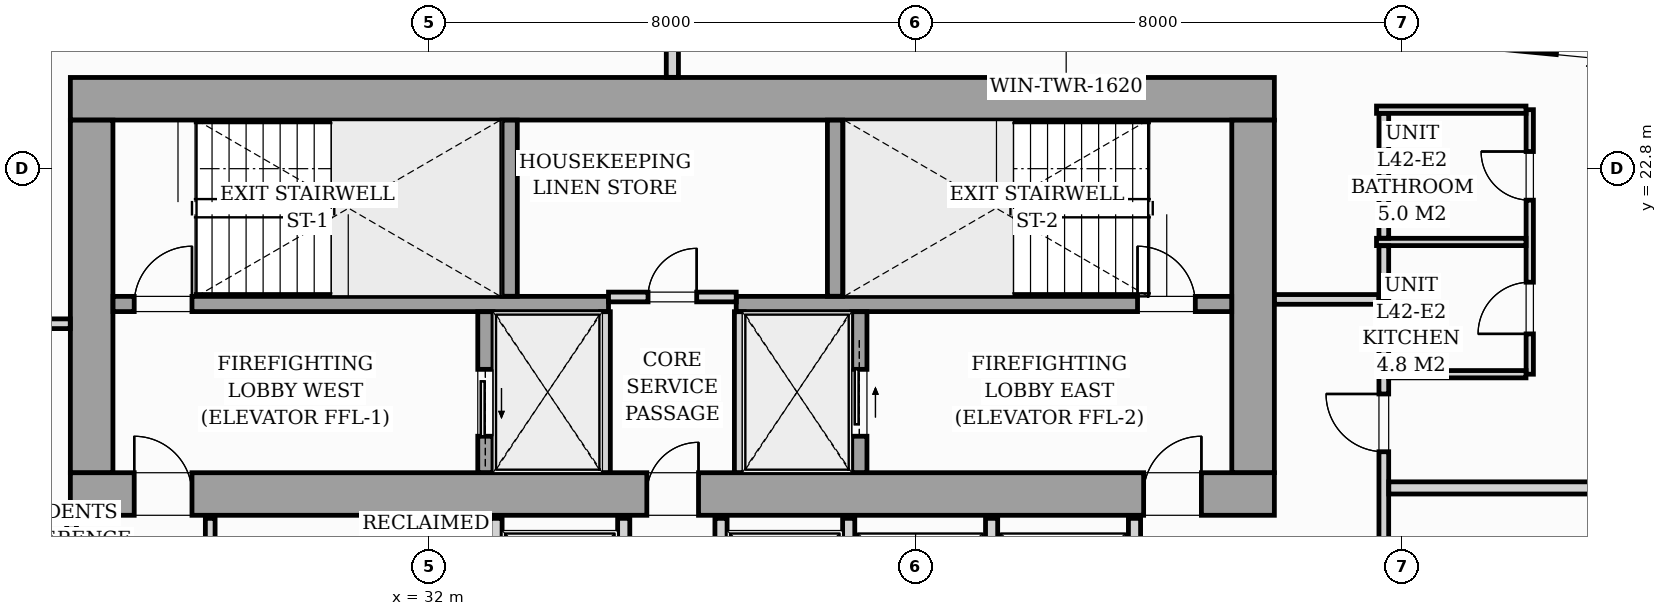
"""IFC4 building model, lengths in metres.
Left out: names, types, materials, properties, quantities, classifications, styles, units other than length and angle.
Written with IfcOpenShell. Run it as: python <this file> out.ifc"""

import sys

from ifc_helpers import new_model, si_unit, direction, frame, frame_2d, origin, origin_2d, place, context, subcontext, project, spatial, rectangle, i_section, extrude, source, transform, mapped, element, fill, save


model = new_model("IFC4")
c1 = context("Model", 3, precision=1e-05, world=origin(), true_north=direction((0.0, 1.0)))
c2 = subcontext(c1, "Body", "Model", "MODEL_VIEW")
j1 = project(units=[si_unit("LENGTHUNIT", "METRE"), si_unit("PLANEANGLEUNIT", "RADIAN")], contexts=[c1])
p1 = place(None, origin())
s1 = spatial("IfcSite", under=j1, at=p1, CompositionType="ELEMENT")
p2 = place(p1, origin())
s2 = spatial("IfcBuilding", under=s1, at=p2, CompositionType="ELEMENT")
p3 = place(p2, frame((0.0, 0.0, 147.0)))
s3 = spatial("IfcBuildingStorey", under=s2, at=p3, CompositionType="ELEMENT", Elevation=147.0)
m1 = source(origin(), c2, "Body", "SweptSolid", [
    extrude(i_section(OverallWidth=0.421, OverallDepth=0.465, WebThickness=0.045, FlangeThickness=0.073, FilletRadius=0.018, at=origin_2d()), origin(), (0.0, 0.0, 1.0), 3.196),
])
for number, where, z_axis, x_axis in (
    (1, (26.4, 17.4, 0.002), (0.0, 0.0, 1.0), (1.0, 0.0, 0.0)),
    (2, (33.12, 17.4, 0.002), (0.0, 0.0, 1.0), (1.0, 0.0, 0.0)),
    (3, (38.88, 17.4, 0.002), (0.0, 0.0, 1.0), (1.0, 0.0, 0.0)),
    (4, (45.6, 17.4, 0.002), (0.0, 0.0, 1.0), (1.0, 0.0, 0.0)),
    (5, (26.4, 24.0, 0.002), (0.0, 0.0, 1.0), (1.0, 0.0, 0.0)),
    (6, (33.12, 24.0, 0.002), (0.0, 0.0, 1.0), (1.0, 0.0, 0.0)),
    (7, (38.88, 24.0, 0.002), (0.0, 0.0, 1.0), (1.0, 0.0, 0.0)),
    (8, (45.6, 24.0, 0.002), (0.0, 0.0, 1.0), (1.0, 0.0, 0.0)),
):
    element("IfcColumn", number, at=place(p3, frame(where, z_axis=z_axis, x_axis=x_axis)), inside=s3, PredefinedType="PILASTER", context=c2, shape_type="MappedRepresentation", body=[
        mapped(m1, transform((0.0, 0.0, 0.0), scale=1.0)),
    ])
p4 = place(p3, frame((40.983, 25.727, 0.0), z_axis=(0.0, 0.0, 1.0), x_axis=(0.995395844771, -0.095849424686, 0.0)))
e9 = element("IfcWall", 9, at=p4, inside=s3, PredefinedType="STANDARD", context=c2, shape_type="SweptSolid", body=[
    extrude(rectangle(XDim=17.01, YDim=0.26, at=frame_2d((8.505, 0.0))), origin(), (0.0, 0.0, 1.0), 2.94),
])
p5 = place(p4, frame((9.61, 0.0, 0.0)))
e10 = element("IfcOpeningElement", 10, at=p5, cuts=e9, PredefinedType="OPENING", context=c2, shape_type="SweptSolid", body=[
    extrude(rectangle(XDim=1.8, YDim=2.06, at=frame_2d((0.9, 1.03))), frame((0.0, 0.14, 0.0), z_axis=(0.0, -1.0, 0.0), x_axis=(1.0, 0.0, 0.0)), (0.0, 0.0, 1.0), 0.28),
])
p6 = place(p4, frame((0.7, 0.0, 0.65)))
e11 = element("IfcOpeningElement", 11, at=p6, cuts=e9, PredefinedType="OPENING", context=c2, shape_type="SweptSolid", body=[
    extrude(rectangle(XDim=1.6, YDim=1.5, at=frame_2d((0.8, 0.75))), frame((0.0, 0.14, 0.0), z_axis=(0.0, -1.0, 0.0), x_axis=(1.0, 0.0, 0.0)), (0.0, 0.0, 1.0), 0.28),
])
p7 = place(p3, frame((26.1, 17.45, 0.0), z_axis=(0.0, 0.0, 1.0), x_axis=(1.0, 0.0, 0.0)))
e12 = element("IfcWall", 12, at=p7, inside=s3, PredefinedType="SHEAR", context=c2, shape_type="SweptSolid", body=[
    extrude(rectangle(XDim=19.8, YDim=0.7, at=frame_2d((9.9, 0.0))), origin(), (0.0, 0.0, 1.0), 3.2),
])
p8 = place(p7, frame((1.05, 0.0, 0.0)))
e13 = element("IfcOpeningElement", 13, at=p8, cuts=e12, PredefinedType="OPENING", context=c2, shape_type="SweptSolid", body=[
    extrude(rectangle(XDim=0.95, YDim=2.06, at=frame_2d((0.475, 1.03))), frame((0.0, 0.36, 0.0), z_axis=(0.0, -1.0, 0.0), x_axis=(1.0, 0.0, 0.0)), (0.0, 0.0, 1.0), 0.72),
])
p9 = place(p7, frame((9.48, 0.0, 0.0)))
e14 = element("IfcOpeningElement", 14, at=p9, cuts=e12, PredefinedType="OPENING", context=c2, shape_type="SweptSolid", body=[
    extrude(rectangle(XDim=0.85, YDim=2.0, at=frame_2d((0.425, 1.0))), frame((0.0, 0.36, 0.0), z_axis=(0.0, -1.0, 0.0), x_axis=(1.0, 0.0, 0.0)), (0.0, 0.0, 1.0), 0.72),
])
p10 = place(p7, frame((17.65, 0.0, 0.0)))
e15 = element("IfcOpeningElement", 15, at=p10, cuts=e12, PredefinedType="OPENING", context=c2, shape_type="SweptSolid", body=[
    extrude(rectangle(XDim=0.95, YDim=2.06, at=frame_2d((0.475, 1.03))), frame((0.0, 0.36, 0.0), z_axis=(0.0, -1.0, 0.0), x_axis=(1.0, 0.0, 0.0)), (0.0, 0.0, 1.0), 0.72),
])
p11 = place(p3, frame((26.1, 23.95, 0.0), z_axis=(0.0, 0.0, 1.0), x_axis=(1.0, 0.0, 0.0)))
e16 = element("IfcWall", 16, at=p11, inside=s3, PredefinedType="SHEAR", context=c2, shape_type="SweptSolid", body=[
    extrude(rectangle(XDim=19.8, YDim=0.7, at=frame_2d((9.9, 0.0))), origin(), (0.0, 0.0, 1.0), 3.2),
])
for number, where, z_axis, x_axis in (
    (17, (26.45, 17.802, 0.0), (0.0, 0.0, 1.0), (0.0, 1.0, 0.0)),
    (18, (45.55, 17.802, 0.0), (0.0, 0.0, 1.0), (0.0, 1.0, 0.0)),
):
    element("IfcWall", number, at=place(p3, frame(where, z_axis=z_axis, x_axis=x_axis)), inside=s3, PredefinedType="SHEAR", context=c2, shape_type="SweptSolid", body=[
        extrude(rectangle(XDim=5.796, YDim=0.7, at=frame_2d((2.898, 0.0))), origin(), (0.0, 0.0, 1.0), 3.2),
    ])
p12 = place(p3, frame((26.802, 20.575, 0.0), z_axis=(0.0, 0.0, 1.0), x_axis=(1.0, 0.0, 0.0)))
e19 = element("IfcWall", 19, at=p12, inside=s3, PredefinedType="SOLIDWALL", context=c2, shape_type="SweptSolid", body=[
    extrude(rectangle(XDim=8.148, YDim=0.25, at=frame_2d((4.074, 0.0))), origin(), (0.0, 0.0, 1.0), 3.2),
])
p13 = place(p12, frame((0.348, 0.0, 0.0)))
e20 = element("IfcOpeningElement", 20, at=p13, cuts=e19, PredefinedType="OPENING", context=c2, shape_type="SweptSolid", body=[
    extrude(rectangle(XDim=0.95, YDim=2.06, at=frame_2d((0.475, 1.03))), frame((0.0, 0.135, 0.0), z_axis=(0.0, -1.0, 0.0), x_axis=(1.0, 0.0, 0.0)), (0.0, 0.0, 1.0), 0.27),
])
p14 = place(p3, frame((37.05, 20.575, 0.0), z_axis=(0.0, 0.0, 1.0), x_axis=(1.0, 0.0, 0.0)))
e21 = element("IfcWall", 21, at=p14, inside=s3, PredefinedType="SOLIDWALL", context=c2, shape_type="SweptSolid", body=[
    extrude(rectangle(XDim=8.148, YDim=0.25, at=frame_2d((4.074, 0.0))), origin(), (0.0, 0.0, 1.0), 3.2),
])
p15 = place(p14, frame((6.6, 0.0, 0.0)))
e22 = element("IfcOpeningElement", 22, at=p15, cuts=e21, PredefinedType="OPENING", context=c2, shape_type="SweptSolid", body=[
    extrude(rectangle(XDim=0.95, YDim=2.06, at=frame_2d((0.475, 1.03))), frame((0.0, 0.135, 0.0), z_axis=(0.0, -1.0, 0.0), x_axis=(1.0, 0.0, 0.0)), (0.0, 0.0, 1.0), 0.27),
])
for number, where, z_axis, x_axis in (
    (23, (33.325, 20.702, 0.0), (0.0, 0.0, 1.0), (0.0, 1.0, 0.0)),
    (24, (38.675, 20.702, 0.0), (0.0, 0.0, 1.0), (0.0, 1.0, 0.0)),
):
    element("IfcWall", number, at=place(p3, frame(where, z_axis=z_axis, x_axis=x_axis)), inside=s3, PredefinedType="SOLIDWALL", context=c2, shape_type="SweptSolid", body=[
        extrude(rectangle(XDim=2.896, YDim=0.25, at=frame_2d((1.448, 0.0))), origin(), (0.0, 0.0, 1.0), 3.2),
    ])
p16 = place(p3, frame((32.925, 17.802, 0.0), z_axis=(0.0, 0.0, 1.0), x_axis=(0.0, 1.0, 0.0)))
e25 = element("IfcWall", 25, at=p16, inside=s3, PredefinedType="SOLIDWALL", context=c2, shape_type="SweptSolid", body=[
    extrude(rectangle(XDim=2.646, YDim=0.25, at=frame_2d((1.323, 0.0))), origin(), (0.0, 0.0, 1.0), 3.2),
])
p17 = place(p16, frame((0.598, 0.0, 0.0)))
e26 = element("IfcOpeningElement", 26, at=p17, cuts=e25, PredefinedType="OPENING", context=c2, shape_type="SweptSolid", body=[
    extrude(rectangle(XDim=1.1, YDim=2.08, at=frame_2d((0.55, 1.04))), frame((0.0, 0.135, 0.0), z_axis=(0.0, -1.0, 0.0), x_axis=(1.0, 0.0, 0.0)), (0.0, 0.0, 1.0), 0.27),
])
for number, where, z_axis, x_axis in (
    (27, (34.9, 17.802, 0.0), (0.0, 0.0, 1.0), (0.0, 1.0, 0.0)),
    (28, (37.1, 17.802, 0.0), (0.0, 0.0, 1.0), (0.0, 1.0, 0.0)),
):
    element("IfcWall", number, at=place(p3, frame(where, z_axis=z_axis, x_axis=x_axis)), inside=s3, PredefinedType="PARTITIONING", context=c2, shape_type="SweptSolid", body=[
        extrude(rectangle(XDim=2.646, YDim=0.16, at=frame_2d((1.323, 0.0))), origin(), (0.0, 0.0, 1.0), 2.94),
    ])
p18 = place(p3, frame((39.075, 17.802, 0.0), z_axis=(0.0, 0.0, 1.0), x_axis=(0.0, 1.0, 0.0)))
e29 = element("IfcWall", 29, at=p18, inside=s3, PredefinedType="SOLIDWALL", context=c2, shape_type="SweptSolid", body=[
    extrude(rectangle(XDim=2.646, YDim=0.25, at=frame_2d((1.323, 0.0))), origin(), (0.0, 0.0, 1.0), 3.2),
])
p19 = place(p18, frame((0.598, 0.0, 0.0)))
e30 = element("IfcOpeningElement", 30, at=p19, cuts=e29, PredefinedType="OPENING", context=c2, shape_type="SweptSolid", body=[
    extrude(rectangle(XDim=1.1, YDim=2.08, at=frame_2d((0.55, 1.04))), frame((0.0, 0.135, 0.0), z_axis=(0.0, -1.0, 0.0), x_axis=(1.0, 0.0, 0.0)), (0.0, 0.0, 1.0), 0.27),
])
p20 = place(p3, frame((34.95, 20.69, 0.0), z_axis=(0.0, 0.0, 1.0), x_axis=(1.0, 0.0, 0.0)))
e31 = element("IfcWall", 31, at=p20, inside=s3, PredefinedType="PARTITIONING", context=c2, shape_type="SweptSolid", body=[
    extrude(rectangle(XDim=2.1, YDim=0.16, at=frame_2d((1.05, 0.0))), origin(), (0.0, 0.0, 1.0), 2.94),
])
p21 = place(p20, frame((0.65, 0.0, 0.0)))
e32 = element("IfcOpeningElement", 32, at=p21, cuts=e31, PredefinedType="OPENING", context=c2, shape_type="SweptSolid", body=[
    extrude(rectangle(XDim=0.8, YDim=2.05, at=frame_2d((0.4, 1.025))), frame((0.0, 0.09, 0.0), z_axis=(0.0, -1.0, 0.0), x_axis=(1.0, 0.0, 0.0)), (0.0, 0.0, 1.0), 0.18),
])
p22 = place(p3, frame((28.4, 14.75, 0.0), z_axis=(0.0, 0.0, 1.0), x_axis=(0.0, 1.0, 0.0)))
e33 = element("IfcWall", 33, at=p22, inside=s3, PredefinedType="PARTITIONING", context=c2, shape_type="SweptSolid", body=[
    extrude(rectangle(XDim=2.3, YDim=0.16, at=frame_2d((1.15, 0.0))), origin(), (0.0, 0.0, 1.0), 2.94),
])
for number, where, z_axis, x_axis in (
    (34, (33.1, 14.75, 0.0), (0.0, 0.0, 1.0), (0.0, 1.0, 0.0)),
    (35, (35.2, 14.75, 0.0), (0.0, 0.0, 1.0), (0.0, 1.0, 0.0)),
    (36, (36.8, 14.75, 0.0), (0.0, 0.0, 1.0), (0.0, 1.0, 0.0)),
    (37, (38.9, 14.75, 0.0), (0.0, 0.0, 1.0), (0.0, 1.0, 0.0)),
    (38, (41.25, 14.75, 0.0), (0.0, 0.0, 1.0), (0.0, 1.0, 0.0)),
    (39, (43.6, 14.75, 0.0), (0.0, 0.0, 1.0), (0.0, 1.0, 0.0)),
):
    element("IfcWall", number, at=place(p3, frame(where, z_axis=z_axis, x_axis=x_axis)), inside=s3, PredefinedType="PARTITIONING", context=c2, shape_type="SweptSolid", body=[
        extrude(rectangle(XDim=2.3, YDim=0.2, at=frame_2d((1.15, 0.0))), origin(), (0.0, 0.0, 1.0), 2.94),
    ])
p23 = place(p3, frame((47.7, 12.832, 0.0), z_axis=(0.0, 0.0, 1.0), x_axis=(0.0, 1.0, 0.0)))
e40 = element("IfcWall", 40, at=p23, inside=s3, PredefinedType="PARTITIONING", context=c2, shape_type="SweptSolid", body=[
    extrude(rectangle(XDim=7.818, YDim=0.16, at=frame_2d((3.909, 0.0))), origin(), (0.0, 0.0, 1.0), 2.94),
])
p24 = place(p23, frame((0.493, 0.0, 0.0)))
e41 = element("IfcOpeningElement", 41, at=p24, cuts=e40, PredefinedType="OPENING", context=c2, shape_type="SweptSolid", body=[
    extrude(rectangle(XDim=0.95, YDim=2.06, at=frame_2d((0.475, 1.03))), frame((0.0, 0.09, 0.0), z_axis=(0.0, -1.0, 0.0), x_axis=(1.0, 0.0, 0.0)), (0.0, 0.0, 1.0), 0.18),
])
p25 = place(p23, frame((5.313, 0.0, 0.0)))
e42 = element("IfcOpeningElement", 42, at=p25, cuts=e40, PredefinedType="OPENING", context=c2, shape_type="SweptSolid", body=[
    extrude(rectangle(XDim=0.95, YDim=2.06, at=frame_2d((0.475, 1.03))), frame((0.0, 0.09, 0.0), z_axis=(0.0, -1.0, 0.0), x_axis=(1.0, 0.0, 0.0)), (0.0, 0.0, 1.0), 0.18),
])
p26 = place(p3, frame((36.0, 24.302, 0.0), z_axis=(0.0, 0.0, 1.0), x_axis=(0.0, 1.0, 0.0)))
e43 = element("IfcWall", 43, at=p26, inside=s3, PredefinedType="PARTITIONING", context=c2, shape_type="SweptSolid", body=[
    extrude(rectangle(XDim=1.955, YDim=0.2, at=frame_2d((0.978, 0.0))), origin(), (0.0, 0.0, 1.0), 2.94),
])
p27 = place(p3, frame((45.902, 20.65, 0.0), z_axis=(0.0, 0.0, 1.0), x_axis=(1.0, 0.0, 0.0)))
e44 = element("IfcWall", 44, at=p27, inside=s3, PredefinedType="PARTITIONING", context=c2, shape_type="SweptSolid", body=[
    extrude(rectangle(XDim=1.716, YDim=0.16, at=frame_2d((0.858, 0.0))), origin(), (0.0, 0.0, 1.0), 2.94),
])
p28 = place(p3, frame((47.782, 17.55, 0.0), z_axis=(0.0, 0.0, 1.0), x_axis=(1.0, 0.0, 0.0)))
e45 = element("IfcWall", 45, at=p28, inside=s3, PredefinedType="PARTITIONING", context=c2, shape_type="SweptSolid", body=[
    extrude(rectangle(XDim=11.934, YDim=0.2, at=frame_2d((5.967, 0.0))), origin(), (0.0, 0.0, 1.0), 2.94),
])
p29 = place(p3, frame((50.1, 19.42, 0.0), z_axis=(0.0, 0.0, 1.0), x_axis=(0.0, 1.0, 0.0)))
e46 = element("IfcWall", 46, at=p29, inside=s3, PredefinedType="PARTITIONING", context=c2, shape_type="SweptSolid", body=[
    extrude(rectangle(XDim=4.35, YDim=0.12, at=frame_2d((2.175, 0.0))), origin(), (0.0, 0.0, 1.0), 2.94),
])
p30 = place(p29, frame((0.663, 0.0, 0.0)))
e47 = element("IfcOpeningElement", 47, at=p30, cuts=e46, PredefinedType="OPENING", context=c2, shape_type="SweptSolid", body=[
    extrude(rectangle(XDim=0.85, YDim=2.05, at=frame_2d((0.425, 1.025))), frame((0.0, 0.07, 0.0), z_axis=(0.0, -1.0, 0.0), x_axis=(1.0, 0.0, 0.0)), (0.0, 0.0, 1.0), 0.14),
])
p31 = place(p29, frame((2.862, 0.0, 0.0)))
e48 = element("IfcOpeningElement", 48, at=p31, cuts=e46, PredefinedType="OPENING", context=c2, shape_type="SweptSolid", body=[
    extrude(rectangle(XDim=0.8, YDim=2.02, at=frame_2d((0.4, 1.01))), frame((0.0, 0.07, 0.0), z_axis=(0.0, -1.0, 0.0), x_axis=(1.0, 0.0, 0.0)), (0.0, 0.0, 1.0), 0.14),
])
p32 = place(p3, frame((47.58, 21.595, 0.0), z_axis=(0.0, 0.0, 1.0), x_axis=(1.0, 0.0, 0.0)))
e49 = element("IfcWall", 49, at=p32, inside=s3, PredefinedType="PARTITIONING", context=c2, shape_type="SweptSolid", body=[
    extrude(rectangle(XDim=2.458, YDim=0.12, at=frame_2d((1.229, 0.0))), origin(), (0.0, 0.0, 1.0), 2.94),
])
p33 = place(p3, frame((47.782, 19.42, 0.0), z_axis=(0.0, 0.0, 1.0), x_axis=(1.0, 0.0, 0.0)))
e50 = element("IfcWall", 50, at=p33, inside=s3, PredefinedType="PARTITIONING", context=c2, shape_type="SweptSolid", body=[
    extrude(rectangle(XDim=2.256, YDim=0.12, at=frame_2d((1.128, 0.0))), origin(), (0.0, 0.0, 1.0), 2.94),
])
p34 = place(p3, frame((47.58, 23.77, 0.0), z_axis=(0.0, 0.0, 1.0), x_axis=(1.0, 0.0, 0.0)))
e51 = element("IfcWall", 51, at=p34, inside=s3, PredefinedType="PARTITIONING", context=c2, shape_type="SweptSolid", body=[
    extrude(rectangle(XDim=2.458, YDim=0.12, at=frame_2d((1.229, 0.0))), origin(), (0.0, 0.0, 1.0), 2.216),
])
p35 = place(p3, frame((47.7, 20.65, 0.0), z_axis=(0.0, 0.0, 1.0), x_axis=(0.0, 1.0, 0.0)))
e52 = element("IfcWall", 52, at=p35, inside=s3, PredefinedType="PARTITIONING", context=c2, shape_type="SweptSolid", body=[
    extrude(rectangle(XDim=0.883, YDim=0.16, at=frame_2d((0.441, 0.0))), origin(), (0.0, 0.0, 1.0), 2.94),
])
p36 = place(p3, frame((47.7, 21.657, 0.0), z_axis=(0.0, 0.0, 1.0), x_axis=(0.0, 1.0, 0.0)))
e53 = element("IfcWall", 53, at=p36, inside=s3, PredefinedType="PARTITIONING", context=c2, shape_type="SweptSolid", body=[
    extrude(rectangle(XDim=2.051, YDim=0.16, at=frame_2d((1.025, 0.0))), origin(), (0.0, 0.0, 1.0), 2.94),
])
p37 = place(p3, frame((24.182, 20.25, 0.0), z_axis=(0.0, 0.0, 1.0), x_axis=(1.0, 0.0, 0.0)))
e54 = element("IfcWall", 54, at=p37, inside=s3, PredefinedType="PARTITIONING", context=c2, shape_type="SweptSolid", body=[
    extrude(rectangle(XDim=1.916, YDim=0.16, at=frame_2d((0.958, 0.0))), origin(), (0.0, 0.0, 1.0), 2.94),
])
p38 = place(p3, frame((26.12, 14.66, 0.0), z_axis=(0.0, 0.0, 1.0), x_axis=(0.0, 1.0, 0.0)))
e55 = element("IfcWall", 55, at=p38, inside=s3, PredefinedType="PARTITIONING", context=c2, shape_type="SweptSolid", body=[
    extrude(rectangle(XDim=2.438, YDim=0.16, at=frame_2d((1.219, 0.0))), origin(), (0.0, 0.0, 1.0), 2.94),
])
m2 = source(origin(), c2, "Body", "SweptSolid", [
    extrude(rectangle(XDim=1.8, YDim=2.06, at=frame_2d((0.9, 1.03))), frame((0.0, 0.025, 0.0), z_axis=(0.0, -1.0, 0.0), x_axis=(1.0, 0.0, 0.0)), (0.0, 0.0, 1.0), 0.05),
])
p39 = place(p5, origin())
e56 = element("IfcDoor", 56, at=p39, inside=s3, OperationType="SLIDING_TO_RIGHT", PredefinedType="DOOR", context=c2, shape_type="MappedRepresentation", body=[
    mapped(m2, transform((0.0, 0.0, 0.0), scale=1.0)),
])
fill(e10, e56)
m3 = source(origin(), c2, "Body", "SweptSolid", [
    extrude(rectangle(XDim=0.95, YDim=2.06, at=frame_2d((0.475, 1.03))), frame((0.0, 0.025, 0.0), z_axis=(0.0, -1.0, 0.0), x_axis=(1.0, 0.0, 0.0)), (0.0, 0.0, 1.0), 0.05),
])
p40 = place(p8, origin())
e57 = element("IfcDoor", 57, at=p40, inside=s3, OperationType="SINGLE_SWING_LEFT", PredefinedType="DOOR", context=c2, shape_type="MappedRepresentation", body=[
    mapped(m3, transform((0.0, 0.0, 0.0), scale=1.0)),
])
fill(e13, e57)
m4 = source(origin(), c2, "Body", "SweptSolid", [
    extrude(rectangle(XDim=0.85, YDim=2.0, at=frame_2d((0.425, 1.0))), frame((0.0, 0.025, 0.0), z_axis=(0.0, -1.0, 0.0), x_axis=(1.0, 0.0, 0.0)), (0.0, 0.0, 1.0), 0.05),
])
p41 = place(p9, origin())
e58 = element("IfcDoor", 58, at=p41, inside=s3, OperationType="SINGLE_SWING_RIGHT", PredefinedType="DOOR", context=c2, shape_type="MappedRepresentation", body=[
    mapped(m4, transform((0.0, 0.0, 0.0), scale=1.0)),
])
fill(e14, e58)
p42 = place(p10, origin())
e59 = element("IfcDoor", 59, at=p42, inside=s3, OperationType="SINGLE_SWING_RIGHT", PredefinedType="DOOR", context=c2, shape_type="MappedRepresentation", body=[
    mapped(m3, transform((0.0, 0.0, 0.0), scale=1.0)),
])
fill(e15, e59)
p43 = place(p13, origin())
e60 = element("IfcDoor", 60, at=p43, inside=s3, OperationType="SINGLE_SWING_RIGHT", PredefinedType="DOOR", context=c2, shape_type="MappedRepresentation", body=[
    mapped(m3, transform((0.0, 0.0, 0.0), scale=1.0)),
])
fill(e20, e60)
p44 = place(p15, origin())
e61 = element("IfcDoor", 61, at=p44, inside=s3, OperationType="SINGLE_SWING_LEFT", PredefinedType="DOOR", context=c2, shape_type="MappedRepresentation", body=[
    mapped(m3, transform((0.0, 0.0, 0.0), scale=1.0)),
])
fill(e22, e61)
m5 = source(origin(), c2, "Body", "SweptSolid", [
    extrude(rectangle(XDim=1.1, YDim=2.08, at=frame_2d((0.55, 1.04))), frame((0.0, 0.025, 0.0), z_axis=(0.0, -1.0, 0.0), x_axis=(1.0, 0.0, 0.0)), (0.0, 0.0, 1.0), 0.05),
])
p45 = place(p17, origin())
e62 = element("IfcDoor", 62, at=p45, inside=s3, OperationType="SLIDING_TO_LEFT", PredefinedType="DOOR", context=c2, shape_type="MappedRepresentation", body=[
    mapped(m5, transform((0.0, 0.0, 0.0), scale=1.0)),
])
fill(e26, e62)
p46 = place(p19, origin())
e63 = element("IfcDoor", 63, at=p46, inside=s3, OperationType="SLIDING_TO_RIGHT", PredefinedType="DOOR", context=c2, shape_type="MappedRepresentation", body=[
    mapped(m5, transform((0.0, 0.0, 0.0), scale=1.0)),
])
fill(e30, e63)
m6 = source(origin(), c2, "Body", "SweptSolid", [
    extrude(rectangle(XDim=0.8, YDim=2.05, at=frame_2d((0.4, 1.025))), frame((0.0, 0.025, 0.0), z_axis=(0.0, -1.0, 0.0), x_axis=(1.0, 0.0, 0.0)), (0.0, 0.0, 1.0), 0.05),
])
p47 = place(p21, origin())
e64 = element("IfcDoor", 64, at=p47, inside=s3, OperationType="SINGLE_SWING_RIGHT", PredefinedType="DOOR", context=c2, shape_type="MappedRepresentation", body=[
    mapped(m6, transform((0.0, 0.0, 0.0), scale=1.0)),
])
fill(e32, e64)
m7 = source(origin(), c2, "Body", "SweptSolid", [
    extrude(rectangle(XDim=0.95, YDim=2.06, at=frame_2d((0.475, 1.03))), frame((0.0, 0.025, 0.0), z_axis=(0.0, -1.0, 0.0), x_axis=(1.0, 0.0, 0.0)), (0.0, 0.0, 1.0), 0.05),
])
p48 = place(p25, origin())
e65 = element("IfcDoor", 65, at=p48, inside=s3, OperationType="SINGLE_SWING_RIGHT", PredefinedType="DOOR", context=c2, shape_type="MappedRepresentation", body=[
    mapped(m7, transform((0.0, 0.0, 0.0), scale=1.0)),
])
fill(e42, e65)
m8 = source(origin(), c2, "Body", "SweptSolid", [
    extrude(rectangle(XDim=0.85, YDim=2.05, at=frame_2d((0.425, 1.025))), frame((0.0, 0.025, 0.0), z_axis=(0.0, -1.0, 0.0), x_axis=(1.0, 0.0, 0.0)), (0.0, 0.0, 1.0), 0.05),
])
p49 = place(p30, origin())
e66 = element("IfcDoor", 66, at=p49, inside=s3, OperationType="SINGLE_SWING_LEFT", PredefinedType="DOOR", context=c2, shape_type="MappedRepresentation", body=[
    mapped(m8, transform((0.0, 0.0, 0.0), scale=1.0)),
])
fill(e47, e66)
m9 = source(origin(), c2, "Body", "SweptSolid", [
    extrude(rectangle(XDim=0.8, YDim=2.02, at=frame_2d((0.4, 1.01))), frame((0.0, 0.025, 0.0), z_axis=(0.0, -1.0, 0.0), x_axis=(1.0, 0.0, 0.0)), (0.0, 0.0, 1.0), 0.05),
])
p50 = place(p31, origin())
e67 = element("IfcDoor", 67, at=p50, inside=s3, OperationType="SINGLE_SWING_RIGHT", PredefinedType="DOOR", context=c2, shape_type="MappedRepresentation", body=[
    mapped(m9, transform((0.0, 0.0, 0.0), scale=1.0)),
])
fill(e48, e67)
save(model, sys.argv[1])
